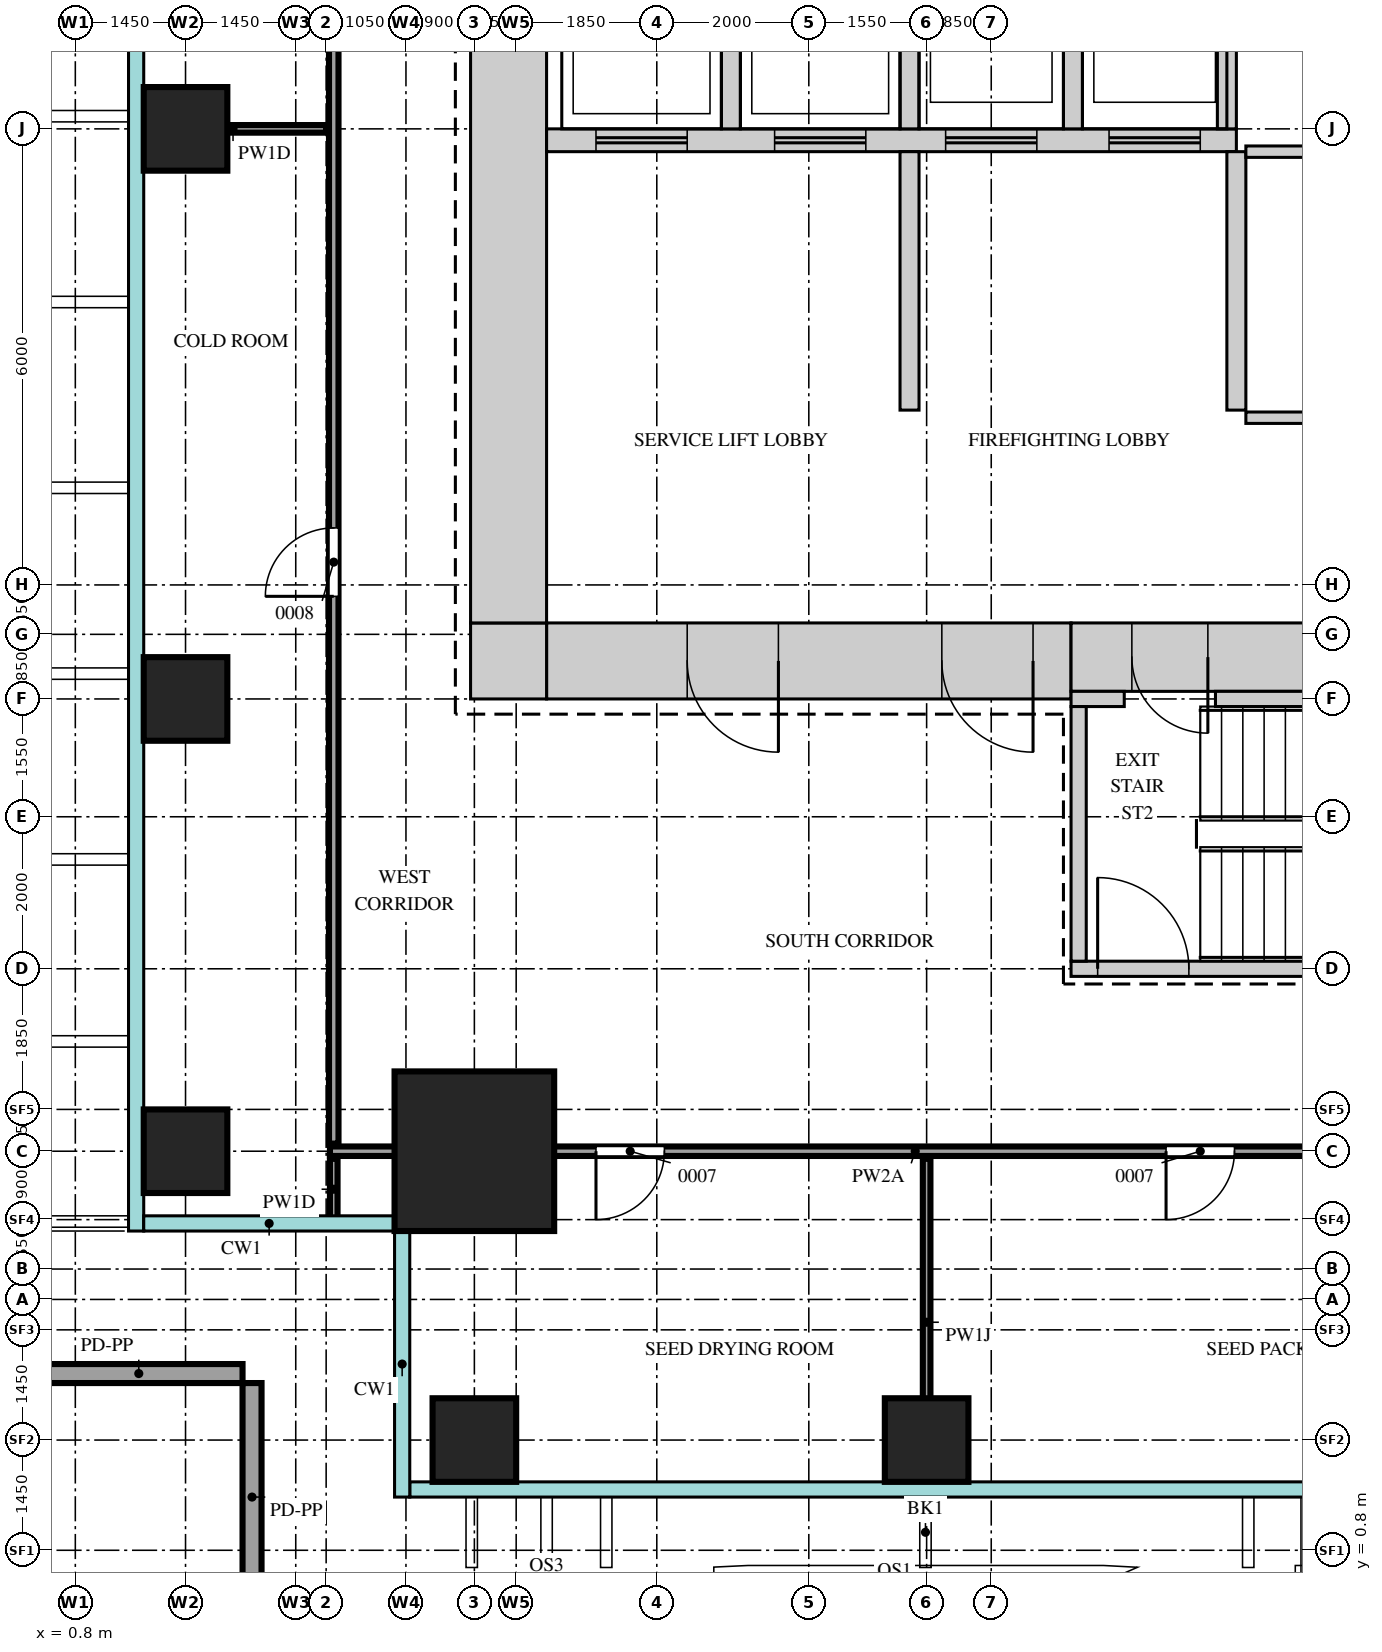
"""IFC4 building model, lengths in metres.
Left out: names, types, materials, properties, quantities, classifications, styles, units other than length and angle.
Written with IfcOpenShell. Run it as: python <this file> out.ifc"""

import sys

from ifc_helpers import new_model, si_unit, direction, frame, frame_2d, origin, origin_2d, place, context, subcontext, project, spatial, rectangle, extrude, source, transform, mapped, element, fill, save


model = new_model("IFC4")
c1 = context("Model", 3, precision=1e-05, world=origin(), true_north=direction((0.0, 1.0)))
c2 = subcontext(c1, "Body", "Model", "MODEL_VIEW")
j1 = project(units=[si_unit("LENGTHUNIT", "METRE"), si_unit("PLANEANGLEUNIT", "RADIAN")], contexts=[c1])
p1 = place(None, origin())
s1 = spatial("IfcSite", under=j1, at=p1, CompositionType="ELEMENT")
p2 = place(p1, origin())
s2 = spatial("IfcBuilding", under=s1, at=p2, CompositionType="ELEMENT")
p3 = place(p2, frame((0.0, 0.0, 101.5)))
s3 = spatial("IfcBuildingStorey", under=s2, at=p3, CompositionType="ELEMENT", Elevation=101.5)
m1 = source(origin(), c2, "Body", "SweptSolid", [
    extrude(rectangle(XDim=6.9, YDim=1.0, at=frame_2d((3.45, 0.0))), origin(), (0.0, 0.0, 1.0), 4.1),
])
p4 = place(p3, frame((7.0, 12.5, 0.0), z_axis=(0.0, 0.0, 1.0), x_axis=(1.0, 0.0, 0.0)))
e1 = element("IfcWall", 1, at=p4, inside=s3, PredefinedType="SHEAR", context=c2, shape_type="MappedRepresentation", body=[
    mapped(m1, transform((0.0, 0.0, 0.0))),
])
m2 = source(origin(), c2, "Body", "SweptSolid", [
    extrude(rectangle(XDim=1.2, YDim=2.1, at=frame_2d((0.6, 1.05))), frame((0.0, 0.51, 0.0), z_axis=(0.0, -1.0, 0.0), x_axis=(1.0, 0.0, 0.0)), (0.0, 0.0, 1.0), 1.02),
])
p5 = place(p4, frame((5.2, 0.0, 0.0)))
e2 = element("IfcOpeningElement", 2, at=p5, cuts=e1, PredefinedType="OPENING", context=c2, shape_type="MappedRepresentation", body=[
    mapped(m2, transform((0.0, 0.0, 0.0))),
])
p6 = place(p4, frame((1.85, 0.0, 0.0)))
e3 = element("IfcOpeningElement", 3, at=p6, cuts=e1, PredefinedType="OPENING", context=c2, shape_type="MappedRepresentation", body=[
    mapped(m2, transform((0.0, 0.0, 0.0))),
])
m3 = source(origin(), c2, "Body", "SweptSolid", [
    extrude(rectangle(XDim=7.2, YDim=0.9, at=frame_2d((3.6, 0.0))), origin(), (0.0, 0.0, 1.0), 4.1),
])
p7 = place(p3, frame((13.9, 12.55, 0.0), z_axis=(0.0, 0.0, 1.0), x_axis=(1.0, 0.0, 0.0)))
e4 = element("IfcWall", 4, at=p7, inside=s3, PredefinedType="SHEAR", context=c2, shape_type="MappedRepresentation", body=[
    mapped(m3, transform((0.0, 0.0, 0.0))),
])
m4 = source(origin(), c2, "Body", "SweptSolid", [
    extrude(rectangle(XDim=1.0, YDim=2.1, at=frame_2d((0.5, 1.05))), frame((0.0, 0.46, 0.0), z_axis=(0.0, -1.0, 0.0), x_axis=(1.0, 0.0, 0.0)), (0.0, 0.0, 1.0), 0.92),
])
p8 = place(p7, frame((0.8, 0.0, 0.0)))
e5 = element("IfcOpeningElement", 5, at=p8, cuts=e4, PredefinedType="OPENING", context=c2, shape_type="MappedRepresentation", body=[
    mapped(m4, transform((0.0, 0.0, 0.0))),
])
m5 = source(origin(), c2, "Body", "SweptSolid", [
    extrude(rectangle(XDim=1.0, YDim=1.0, at=frame_2d((0.5, 0.0))), origin(), (0.0, 0.0, 1.0), 4.1),
])
p9 = place(p3, frame((6.0, 12.5, 0.0), z_axis=(0.0, 0.0, 1.0), x_axis=(1.0, 0.0, 0.0)))
e6 = element("IfcWall", 6, at=p9, inside=s3, PredefinedType="SHEAR", context=c2, shape_type="MappedRepresentation", body=[
    mapped(m5, transform((0.0, 0.0, 0.0))),
])
m6 = source(origin(), c2, "Body", "SweptSolid", [
    extrude(rectangle(XDim=28.0, YDim=1.0, at=frame_2d((14.0, 0.0))), origin(), (0.0, 0.0, 1.0), 4.1),
])
p10 = place(p3, frame((6.5, 13.0, 0.0), z_axis=(0.0, 0.0, 1.0), x_axis=(0.0, 1.0, 0.0)))
e7 = element("IfcWall", 7, at=p10, inside=s3, PredefinedType="SHEAR", context=c2, shape_type="MappedRepresentation", body=[
    mapped(m6, transform((0.0, 0.0, 0.0))),
])
m7 = source(origin(), c2, "Body", "SweptSolid", [
    extrude(rectangle(XDim=0.7, YDim=0.2, at=frame_2d((0.35, 0.0))), origin(), (0.0, 0.0, 1.0), 4.1),
])
p11 = place(p3, frame((13.9, 12.0, 0.0), z_axis=(0.0, 0.0, 1.0), x_axis=(1.0, 0.0, 0.0)))
e8 = element("IfcWall", 8, at=p11, inside=s3, PredefinedType="SHEAR", context=c2, shape_type="MappedRepresentation", body=[
    mapped(m7, transform((0.0, 0.0, 0.0))),
])
m8 = source(origin(), c2, "Body", "SweptSolid", [
    extrude(rectangle(XDim=5.3, YDim=0.2, at=frame_2d((2.65, 0.0))), origin(), (0.0, 0.0, 1.0), 4.1),
])
p12 = place(p3, frame((15.8, 12.0, 0.0), z_axis=(0.0, 0.0, 1.0), x_axis=(1.0, 0.0, 0.0)))
e9 = element("IfcWall", 9, at=p12, inside=s3, PredefinedType="SHEAR", context=c2, shape_type="MappedRepresentation", body=[
    mapped(m8, transform((0.0, 0.0, 0.0))),
])
m9 = source(origin(), c2, "Body", "SweptSolid", [
    extrude(rectangle(XDim=7.2, YDim=0.2, at=frame_2d((3.6, 0.0))), origin(), (0.0, 0.0, 1.0), 4.1),
])
p13 = place(p3, frame((13.9, 8.45, 0.0), z_axis=(0.0, 0.0, 1.0), x_axis=(1.0, 0.0, 0.0)))
e10 = element("IfcWall", 10, at=p13, inside=s3, PredefinedType="SHEAR", context=c2, shape_type="MappedRepresentation", body=[
    mapped(m9, transform((0.0, 0.0, 0.0))),
])
m10 = source(origin(), c2, "Body", "SweptSolid", [
    extrude(rectangle(XDim=1.2, YDim=2.1, at=frame_2d((0.6, 1.05))), frame((0.0, 0.11, 0.0), z_axis=(0.0, -1.0, 0.0), x_axis=(1.0, 0.0, 0.0)), (0.0, 0.0, 1.0), 0.22),
])
p14 = place(p13, frame((0.35, 0.0, 0.0)))
e11 = element("IfcOpeningElement", 11, at=p14, cuts=e10, PredefinedType="OPENING", context=c2, shape_type="MappedRepresentation", body=[
    mapped(m10, transform((0.0, 0.0, 0.0))),
])
m11 = source(origin(), c2, "Body", "SweptSolid", [
    extrude(rectangle(XDim=3.35, YDim=0.2, at=frame_2d((1.675, 0.0))), origin(), (0.0, 0.0, 1.0), 4.1),
])
p15 = place(p3, frame((14.0, 8.55, 0.0), z_axis=(0.0, 0.0, 1.0), x_axis=(0.0, 1.0, 0.0)))
e12 = element("IfcWall", 12, at=p15, inside=s3, PredefinedType="SHEAR", context=c2, shape_type="MappedRepresentation", body=[
    mapped(m11, transform((0.0, 0.0, 0.0))),
])
m12 = source(origin(), c2, "Body", "SweptSolid", [
    extrude(rectangle(XDim=9.075, YDim=0.3, at=frame_2d((4.538, 0.0))), origin(), (0.0, 0.0, 1.0), 4.1),
])
p16 = place(p3, frame((7.0, 19.35, 0.0), z_axis=(0.0, 0.0, 1.0), x_axis=(1.0, 0.0, 0.0)))
e13 = element("IfcWall", 13, at=p16, inside=s3, PredefinedType="STANDARD", context=c2, shape_type="MappedRepresentation", body=[
    mapped(m12, transform((0.0, 0.0, 0.0))),
])
m13 = source(origin(), c2, "Body", "SweptSolid", [
    extrude(rectangle(XDim=1.2, YDim=2.1, at=frame_2d((0.6, 1.05))), frame((0.0, 0.16, 0.0), z_axis=(0.0, -1.0, 0.0), x_axis=(1.0, 0.0, 0.0)), (0.0, 0.0, 1.0), 0.32),
])
p17 = place(p16, frame((0.65, 0.0, 0.0)))
e14 = element("IfcOpeningElement", 14, at=p17, cuts=e13, PredefinedType="OPENING", context=c2, shape_type="MappedRepresentation", body=[
    mapped(m13, transform((0.0, 0.0, 0.0))),
])
p18 = place(p16, frame((3.0, 0.0, 0.0)))
e15 = element("IfcOpeningElement", 15, at=p18, cuts=e13, PredefinedType="OPENING", context=c2, shape_type="MappedRepresentation", body=[
    mapped(m13, transform((0.0, 0.0, 0.0))),
])
p19 = place(p16, frame((5.25, 0.0, 0.0)))
e16 = element("IfcOpeningElement", 16, at=p19, cuts=e13, PredefinedType="OPENING", context=c2, shape_type="MappedRepresentation", body=[
    mapped(m13, transform((0.0, 0.0, 0.0))),
])
p20 = place(p16, frame((7.4, 0.0, 0.0)))
e17 = element("IfcOpeningElement", 17, at=p20, cuts=e13, PredefinedType="OPENING", context=c2, shape_type="MappedRepresentation", body=[
    mapped(m13, transform((0.0, 0.0, 0.0))),
])
m14 = source(origin(), c2, "Body", "SweptSolid", [
    extrude(rectangle(XDim=3.1, YDim=0.25, at=frame_2d((1.55, 0.0))), origin(), (0.0, 0.0, 1.0), 4.1),
])
for number, where, z_axis, x_axis in (
    (18, (9.425, 19.5, 0.0), (0.0, 0.0, 1.0), (0.0, 1.0, 0.0)),
    (19, (11.775, 19.5, 0.0), (0.0, 0.0, 1.0), (0.0, 1.0, 0.0)),
    (20, (13.925, 19.5, 0.0), (0.0, 0.0, 1.0), (0.0, 1.0, 0.0)),
    (21, (15.95, 19.5, 0.0), (0.0, 0.0, 1.0), (0.0, 1.0, 0.0)),
):
    element("IfcWall", number, at=place(p3, frame(where, z_axis=z_axis, x_axis=x_axis)), inside=s3, PredefinedType="STANDARD", context=c2, shape_type="MappedRepresentation", body=[
        mapped(m14, transform((0.0, 0.0, 0.0))),
    ])
m15 = source(origin(), c2, "Body", "SweptSolid", [
    extrude(rectangle(XDim=3.4, YDim=0.25, at=frame_2d((1.7, 0.0))), origin(), (0.0, 0.0, 1.0), 4.1),
])
for number, where, z_axis, x_axis in (
    (22, (16.075, 15.8, 0.0), (0.0, 0.0, 1.0), (0.0, 1.0, 0.0)),
    (23, (11.775, 15.8, 0.0), (0.0, 0.0, 1.0), (0.0, 1.0, 0.0)),
):
    element("IfcWall", number, at=place(p3, frame(where, z_axis=z_axis, x_axis=x_axis)), inside=s3, PredefinedType="STANDARD", context=c2, shape_type="MappedRepresentation", body=[
        mapped(m15, transform((0.0, 0.0, 0.0))),
    ])
m16 = source(origin(), c2, "Body", "SweptSolid", [
    extrude(rectangle(XDim=2.1, YDim=2.1, at=origin_2d()), origin(), (0.0, 0.0, 1.0), 4.4),
])
p21 = place(p3, frame((6.05, 6.05, 0.0), z_axis=(0.0, 0.0, 1.0), x_axis=(1.0, 0.0, 0.0)))
e24 = element("IfcColumn", 24, at=p21, inside=s3, PredefinedType="COLUMN", context=c2, shape_type="MappedRepresentation", body=[
    mapped(m16, transform((0.0, 0.0, 0.0))),
])
m17 = source(origin(), c2, "Body", "SweptSolid", [
    extrude(rectangle(XDim=1.1, YDim=1.1, at=origin_2d()), origin(), (0.0, 0.0, 1.0), 4.1),
])
for number, where, z_axis, x_axis in (
    (25, (6.05, 2.25, 0.0), (0.0, 0.0, 1.0), (1.0, 0.0, 0.0)),
    (26, (12.0, 2.25, 0.0), (0.0, 0.0, 1.0), (1.0, 0.0, 0.0)),
    (27, (2.25, 6.05, 0.0), (0.0, 0.0, 1.0), (1.0, 0.0, 0.0)),
    (28, (2.25, 12.0, 0.0), (0.0, 0.0, 1.0), (1.0, 0.0, 0.0)),
    (29, (2.25, 19.5, 0.0), (0.0, 0.0, 1.0), (1.0, 0.0, 0.0)),
):
    element("IfcColumn", number, at=place(p3, frame(where, z_axis=z_axis, x_axis=x_axis)), inside=s3, PredefinedType="COLUMN", context=c2, shape_type="MappedRepresentation", body=[
        mapped(m17, transform((0.0, 0.0, 0.0))),
    ])
m18 = source(origin(), c2, "Body", "SweptSolid", [
    extrude(rectangle(XDim=3.0, YDim=0.25, at=frame_2d((1.5, 0.0))), origin(), (0.0, 0.0, 1.0), 1.1),
])
p22 = place(p3, frame((3.125, 3.0, 0.0), z_axis=(0.0, 0.0, 1.0), x_axis=(0.0, -1.0, 0.0)))
e30 = element("IfcWall", 30, at=p22, inside=s3, PredefinedType="SOLIDWALL", context=c2, shape_type="MappedRepresentation", body=[
    mapped(m18, transform((0.0, 0.0, 0.0))),
])
m19 = source(origin(), c2, "Body", "SweptSolid", [
    extrude(rectangle(XDim=2.73, YDim=0.25, at=frame_2d((1.365, 0.0))), origin(), (0.0, 0.0, 1.0), 1.1),
])
p23 = place(p3, frame((0.27, 3.125, 0.0), z_axis=(0.0, 0.0, 1.0), x_axis=(1.0, 0.0, 0.0)))
e31 = element("IfcWall", 31, at=p23, inside=s3, PredefinedType="SOLIDWALL", context=c2, shape_type="MappedRepresentation", body=[
    mapped(m19, transform((0.0, 0.0, 0.0))),
])
m20 = source(origin(), c2, "Body", "SweptSolid", [
    extrude(rectangle(XDim=4.3, YDim=0.1, at=frame_2d((2.15, 0.0))), origin(), (0.0, 0.0, 1.0), 3.65),
])
p24 = place(p3, frame((12.0, 1.65, 0.0), z_axis=(0.0, 0.0, 1.0), x_axis=(0.0, 1.0, 0.0)))
e32 = element("IfcWall", 32, at=p24, inside=s3, PredefinedType="PARTITIONING", context=c2, shape_type="MappedRepresentation", body=[
    mapped(m20, transform((0.0, 0.0, 0.0))),
])
m21 = source(origin(), c2, "Body", "SweptSolid", [
    extrude(rectangle(XDim=0.8, YDim=0.1, at=frame_2d((0.4, 0.0))), origin(), (0.0, 0.0, 1.0), 4.2),
])
p25 = place(p3, frame((4.2, 5.15, 0.0), z_axis=(0.0, 0.0, 1.0), x_axis=(0.0, 1.0, 0.0)))
e33 = element("IfcWall", 33, at=p25, inside=s3, PredefinedType="PARTITIONING", context=c2, shape_type="MappedRepresentation", body=[
    mapped(m21, transform((0.0, 0.0, 0.0))),
])
m22 = source(origin(), c2, "Body", "SweptSolid", [
    extrude(rectangle(XDim=22.3, YDim=0.125, at=frame_2d((11.15, 0.0))), origin(), (0.0, 0.0, 1.0), 3.55),
])
p26 = place(p3, frame((4.15, 6.05, 0.0), z_axis=(0.0, 0.0, 1.0), x_axis=(1.0, 0.0, 0.0)))
e34 = element("IfcWall", 34, at=p26, inside=s3, PredefinedType="PARTITIONING", context=c2, shape_type="MappedRepresentation", body=[
    mapped(m22, transform((0.0, 0.0, 0.0))),
])
m23 = source(origin(), c2, "Body", "SweptSolid", [
    extrude(rectangle(XDim=0.9, YDim=2.1, at=frame_2d((0.45, 1.05))), frame((0.0, 0.073, 0.0), z_axis=(0.0, -1.0, 0.0), x_axis=(1.0, 0.0, 0.0)), (0.0, 0.0, 1.0), 0.145),
])
p27 = place(p26, frame((3.5, 0.0, 0.0)))
e35 = element("IfcOpeningElement", 35, at=p27, cuts=e34, PredefinedType="OPENING", context=c2, shape_type="MappedRepresentation", body=[
    mapped(m23, transform((0.0, 0.0, 0.0))),
])
p28 = place(p26, frame((11.0, 0.0, 0.0)))
e36 = element("IfcOpeningElement", 36, at=p28, cuts=e34, PredefinedType="OPENING", context=c2, shape_type="MappedRepresentation", body=[
    mapped(m23, transform((0.0, 0.0, 0.0))),
])
p29 = place(p26, frame((18.35, 0.0, 0.0)))
e37 = element("IfcOpeningElement", 37, at=p29, cuts=e34, PredefinedType="OPENING", context=c2, shape_type="MappedRepresentation", body=[
    mapped(m23, transform((0.0, 0.0, 0.0))),
])
m24 = source(origin(), c2, "Body", "SweptSolid", [
    extrude(rectangle(XDim=41.8, YDim=0.125, at=frame_2d((20.9, 0.0))), origin(), (0.0, 0.0, 1.0), 4.2),
])
p30 = place(p3, frame((4.2, 6.15, 0.0), z_axis=(0.0, 0.0, 1.0), x_axis=(0.0, 1.0, 0.0)))
e38 = element("IfcWall", 38, at=p30, inside=s3, PredefinedType="PARTITIONING", context=c2, shape_type="MappedRepresentation", body=[
    mapped(m24, transform((0.0, 0.0, 0.0))),
])
p31 = place(p30, frame((7.2, 0.0, 0.0)))
e39 = element("IfcOpeningElement", 39, at=p31, cuts=e38, PredefinedType="OPENING", context=c2, shape_type="MappedRepresentation", body=[
    mapped(m23, transform((0.0, 0.0, 0.0))),
])
p32 = place(p30, frame((21.8, 0.0, 0.0)))
e40 = element("IfcOpeningElement", 40, at=p32, cuts=e38, PredefinedType="OPENING", context=c2, shape_type="MappedRepresentation", body=[
    mapped(m23, transform((0.0, 0.0, 0.0))),
])
p33 = place(p30, frame((33.3, 0.0, 0.0)))
e41 = element("IfcOpeningElement", 41, at=p33, cuts=e38, PredefinedType="OPENING", context=c2, shape_type="MappedRepresentation", body=[
    mapped(m23, transform((0.0, 0.0, 0.0))),
])
m25 = source(origin(), c2, "Body", "SweptSolid", [
    extrude(rectangle(XDim=6.6, YDim=0.15, at=frame_2d((3.3, 0.0))), origin(), (0.0, 0.0, 1.0), 4.2),
])
for number, where, z_axis, x_axis in (
    (42, (16.2, 15.7, 0.0), (0.0, 0.0, 1.0), (1.0, 0.0, 0.0)),
    (43, (16.2, 19.2, 0.0), (0.0, 0.0, 1.0), (1.0, 0.0, 0.0)),
):
    element("IfcWall", number, at=place(p3, frame(where, z_axis=z_axis, x_axis=x_axis)), inside=s3, PredefinedType="PARTITIONING", context=c2, shape_type="MappedRepresentation", body=[
        mapped(m25, transform((0.0, 0.0, 0.0))),
    ])
m26 = source(origin(), c2, "Body", "SweptSolid", [
    extrude(rectangle(XDim=2.45, YDim=0.1, at=frame_2d((1.225, 0.0))), origin(), (0.0, 0.0, 1.0), 4.2),
])
p34 = place(p3, frame((1.65, 19.5, 0.0), z_axis=(0.0, 0.0, 1.0), x_axis=(1.0, 0.0, 0.0)))
e44 = element("IfcWall", 44, at=p34, inside=s3, PredefinedType="PARTITIONING", context=c2, shape_type="MappedRepresentation", body=[
    mapped(m26, transform((0.0, 0.0, 0.0))),
])
m27 = source(origin(), c2, "Body", "SweptSolid", [
    extrude(rectangle(XDim=1.2, YDim=2.1, at=frame_2d((0.6, 1.05))), frame((0.0, 0.45, 0.0), z_axis=(0.0, -1.0, 0.0), x_axis=(1.0, 0.0, 0.0)), (0.0, 0.0, 1.0), 0.9),
])
p35 = place(p5, origin())
e45 = element("IfcDoor", 45, at=p35, inside=s3, OperationType="SINGLE_SWING_RIGHT", PredefinedType="DOOR", context=c2, shape_type="MappedRepresentation", body=[
    mapped(m27, transform((0.0, 0.0, 0.0))),
])
fill(e2, e45)
p36 = place(p6, origin())
e46 = element("IfcDoor", 46, at=p36, inside=s3, OperationType="SINGLE_SWING_RIGHT", PredefinedType="DOOR", context=c2, shape_type="MappedRepresentation", body=[
    mapped(m27, transform((0.0, 0.0, 0.0))),
])
fill(e3, e46)
m28 = source(origin(), c2, "Body", "SweptSolid", [
    extrude(rectangle(XDim=1.0, YDim=2.1, at=frame_2d((0.5, 1.05))), frame((0.0, 0.4, 0.0), z_axis=(0.0, -1.0, 0.0), x_axis=(1.0, 0.0, 0.0)), (0.0, 0.0, 1.0), 0.8),
])
p37 = place(p8, origin())
e47 = element("IfcDoor", 47, at=p37, inside=s3, OperationType="SINGLE_SWING_RIGHT", PredefinedType="DOOR", context=c2, shape_type="MappedRepresentation", body=[
    mapped(m28, transform((0.0, 0.0, 0.0))),
])
fill(e5, e47)
m29 = source(origin(), c2, "Body", "SweptSolid", [
    extrude(rectangle(XDim=0.9, YDim=2.1, at=frame_2d((0.45, 1.05))), frame((0.0, 0.025, 0.0), z_axis=(0.0, -1.0, 0.0), x_axis=(1.0, 0.0, 0.0)), (0.0, 0.0, 1.0), 0.05),
])
p38 = place(p27, origin())
e48 = element("IfcDoor", 48, at=p38, inside=s3, OperationType="SINGLE_SWING_LEFT", PredefinedType="DOOR", context=c2, shape_type="MappedRepresentation", body=[
    mapped(m29, transform((0.0, 0.0, 0.0))),
])
fill(e35, e48)
p39 = place(p28, origin())
e49 = element("IfcDoor", 49, at=p39, inside=s3, OperationType="SINGLE_SWING_LEFT", PredefinedType="DOOR", context=c2, shape_type="MappedRepresentation", body=[
    mapped(m29, transform((0.0, 0.0, 0.0))),
])
fill(e36, e49)
p40 = place(p31, origin())
e50 = element("IfcDoor", 50, at=p40, inside=s3, OperationType="SINGLE_SWING_RIGHT", PredefinedType="DOOR", context=c2, shape_type="MappedRepresentation", body=[
    mapped(m29, transform((0.0, 0.0, 0.0))),
])
fill(e39, e50)
m30 = source(origin(), c2, "Body", "SweptSolid", [
    extrude(rectangle(XDim=1.2, YDim=2.1, at=frame_2d((0.6, 1.05))), frame((0.0, 0.025, 0.0), z_axis=(0.0, -1.0, 0.0), x_axis=(1.0, 0.0, 0.0)), (0.0, 0.0, 1.0), 0.05),
])
p41 = place(p14, origin())
e51 = element("IfcDoor", 51, at=p41, inside=s3, OperationType="SINGLE_SWING_RIGHT", PredefinedType="DOOR", context=c2, shape_type="MappedRepresentation", body=[
    mapped(m30, transform((0.0, 0.0, 0.0))),
])
fill(e11, e51)
p42 = place(p17, origin())
e52 = element("IfcDoor", 52, at=p42, inside=s3, OperationType="DOUBLE_DOOR_SLIDING", PredefinedType="DOOR", context=c2, shape_type="MappedRepresentation", body=[
    mapped(m30, transform((0.0, 0.0, 0.0))),
])
fill(e14, e52)
p43 = place(p18, origin())
e53 = element("IfcDoor", 53, at=p43, inside=s3, OperationType="DOUBLE_DOOR_SLIDING", PredefinedType="DOOR", context=c2, shape_type="MappedRepresentation", body=[
    mapped(m30, transform((0.0, 0.0, 0.0))),
])
fill(e15, e53)
p44 = place(p19, origin())
e54 = element("IfcDoor", 54, at=p44, inside=s3, OperationType="DOUBLE_DOOR_SLIDING", PredefinedType="DOOR", context=c2, shape_type="MappedRepresentation", body=[
    mapped(m30, transform((0.0, 0.0, 0.0))),
])
fill(e16, e54)
p45 = place(p20, origin())
e55 = element("IfcDoor", 55, at=p45, inside=s3, OperationType="DOUBLE_DOOR_SLIDING", PredefinedType="DOOR", context=c2, shape_type="MappedRepresentation", body=[
    mapped(m30, transform((0.0, 0.0, 0.0))),
])
fill(e17, e55)
save(model, sys.argv[1])
